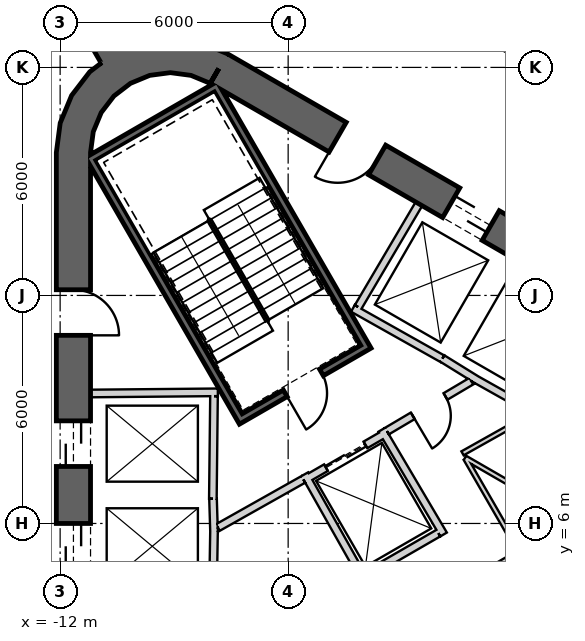
"""IFC4 building model, lengths in metres.
Left out: names, types, materials, properties, quantities, classifications, styles, units other than length and angle.
Written with IfcOpenShell. Run it as: python <this file> out.ifc"""

import sys

from ifc_helpers import new_model, si_unit, direction, frame, frame_2d, origin, place, context, subcontext, project, spatial, polyline, rectangle, outline, extrude, element, fill, save


model = new_model("IFC4")
c1 = context("Model", 3, precision=1e-05, world=origin(), true_north=direction((0.0, 1.0)))
c2 = subcontext(c1, "Body", "Model", "MODEL_VIEW")
j1 = project(units=[si_unit("LENGTHUNIT", "METRE"), si_unit("PLANEANGLEUNIT", "RADIAN")], contexts=[c1])
p1 = place(None, origin())
s1 = spatial("IfcSite", under=j1, at=p1, CompositionType="ELEMENT")
p2 = place(p1, origin())
s2 = spatial("IfcBuilding", under=s1, at=p2, CompositionType="ELEMENT")
p3 = place(p2, frame((0.0, 0.0, 107.0)))
s3 = spatial("IfcBuildingStorey", under=s2, at=p3, CompositionType="ELEMENT", Elevation=107.0)
p4 = place(p3, frame((19.475, 2.208, 0.0), z_axis=(0.0, 0.0, 1.0), x_axis=(-0.866028369851, 0.499994862586, 0.0)))
e1 = element("IfcWall", 1, at=p4, inside=s3, PredefinedType="SHEAR", context=c2, shape_type="SweptSolid", body=[
    extrude(rectangle(XDim=31.523, YDim=0.9, at=frame_2d((15.762, 0.0))), origin(), (0.0, 0.0, 1.0), 4.1),
])
p5 = place(p4, frame((7.062, 0.0, 0.0)))
e2 = element("IfcOpeningElement", 2, at=p5, cuts=e1, PredefinedType="OPENING", context=c2, shape_type="SweptSolid", body=[
    extrude(rectangle(XDim=1.2, YDim=2.4, at=frame_2d((0.6, 1.2))), frame((0.0, 0.46, 0.0), z_axis=(0.0, -1.0, 0.0), x_axis=(1.0, 0.0, 0.0)), (0.0, 0.0, 1.0), 0.92),
])
p6 = place(p4, frame((9.762, 0.0, 0.0)))
e3 = element("IfcOpeningElement", 3, at=p6, cuts=e1, PredefinedType="OPENING", context=c2, shape_type="SweptSolid", body=[
    extrude(rectangle(XDim=1.2, YDim=2.4, at=frame_2d((0.6, 1.2))), frame((0.0, 0.46, 0.0), z_axis=(0.0, -1.0, 0.0), x_axis=(1.0, 0.0, 0.0)), (0.0, 0.0, 1.0), 0.92),
])
p7 = place(p4, frame((12.462, 0.0, 0.0)))
e4 = element("IfcOpeningElement", 4, at=p7, cuts=e1, PredefinedType="OPENING", context=c2, shape_type="SweptSolid", body=[
    extrude(rectangle(XDim=1.2, YDim=2.4, at=frame_2d((0.6, 1.2))), frame((0.0, 0.46, 0.0), z_axis=(0.0, -1.0, 0.0), x_axis=(1.0, 0.0, 0.0)), (0.0, 0.0, 1.0), 0.92),
])
p8 = place(p4, frame((15.162, 0.0, 0.0)))
e5 = element("IfcOpeningElement", 5, at=p8, cuts=e1, PredefinedType="OPENING", context=c2, shape_type="SweptSolid", body=[
    extrude(rectangle(XDim=1.2, YDim=2.4, at=frame_2d((0.6, 1.2))), frame((0.0, 0.46, 0.0), z_axis=(0.0, -1.0, 0.0), x_axis=(1.0, 0.0, 0.0)), (0.0, 0.0, 1.0), 0.92),
])
p9 = place(p4, frame((17.862, 0.0, 0.0)))
e6 = element("IfcOpeningElement", 6, at=p9, cuts=e1, PredefinedType="OPENING", context=c2, shape_type="SweptSolid", body=[
    extrude(rectangle(XDim=1.2, YDim=2.4, at=frame_2d((0.6, 1.2))), frame((0.0, 0.46, 0.0), z_axis=(0.0, -1.0, 0.0), x_axis=(1.0, 0.0, 0.0)), (0.0, 0.0, 1.0), 0.92),
])
p10 = place(p4, frame((20.562, 0.0, 0.0)))
e7 = element("IfcOpeningElement", 7, at=p10, cuts=e1, PredefinedType="OPENING", context=c2, shape_type="SweptSolid", body=[
    extrude(rectangle(XDim=1.2, YDim=2.4, at=frame_2d((0.6, 1.2))), frame((0.0, 0.46, 0.0), z_axis=(0.0, -1.0, 0.0), x_axis=(1.0, 0.0, 0.0)), (0.0, 0.0, 1.0), 0.92),
])
p11 = place(p4, frame((23.262, 0.0, 0.0)))
e8 = element("IfcOpeningElement", 8, at=p11, cuts=e1, PredefinedType="OPENING", context=c2, shape_type="SweptSolid", body=[
    extrude(rectangle(XDim=1.2, YDim=2.4, at=frame_2d((0.6, 1.2))), frame((0.0, 0.46, 0.0), z_axis=(0.0, -1.0, 0.0), x_axis=(1.0, 0.0, 0.0)), (0.0, 0.0, 1.0), 0.92),
])
p12 = place(p4, frame((3.612, 0.0, 0.0)))
e9 = element("IfcOpeningElement", 9, at=p12, cuts=e1, PredefinedType="OPENING", context=c2, shape_type="SweptSolid", body=[
    extrude(rectangle(XDim=1.2, YDim=2.4, at=frame_2d((0.6, 1.2))), frame((0.0, 0.46, 0.0), z_axis=(0.0, -1.0, 0.0), x_axis=(1.0, 0.0, 0.0)), (0.0, 0.0, 1.0), 0.92),
])
p13 = place(p4, frame((26.712, 0.0, 0.0)))
e10 = element("IfcOpeningElement", 10, at=p13, cuts=e1, PredefinedType="OPENING", context=c2, shape_type="SweptSolid", body=[
    extrude(rectangle(XDim=1.2, YDim=2.4, at=frame_2d((0.6, 1.2))), frame((0.0, 0.46, 0.0), z_axis=(0.0, -1.0, 0.0), x_axis=(1.0, 0.0, 0.0)), (0.0, 0.0, 1.0), 0.92),
])
p14 = place(p3, frame((-11.65, 15.762, 0.0), z_axis=(0.0, 0.0, 1.0), x_axis=(0.0, -1.0, 0.0)))
e11 = element("IfcWall", 11, at=p14, inside=s3, PredefinedType="SHEAR", context=c2, shape_type="SweptSolid", body=[
    extrude(rectangle(XDim=31.523, YDim=0.9, at=frame_2d((15.762, 0.0))), origin(), (0.0, 0.0, 1.0), 4.1),
])
p15 = place(p14, frame((7.062, 0.0, 0.0)))
e12 = element("IfcOpeningElement", 12, at=p15, cuts=e11, PredefinedType="OPENING", context=c2, shape_type="SweptSolid", body=[
    extrude(rectangle(XDim=1.2, YDim=2.4, at=frame_2d((0.6, 1.2))), frame((0.0, 0.46, 0.0), z_axis=(0.0, -1.0, 0.0), x_axis=(1.0, 0.0, 0.0)), (0.0, 0.0, 1.0), 0.92),
])
p16 = place(p14, frame((9.762, 0.0, 0.0)))
e13 = element("IfcOpeningElement", 13, at=p16, cuts=e11, PredefinedType="OPENING", context=c2, shape_type="SweptSolid", body=[
    extrude(rectangle(XDim=1.2, YDim=2.4, at=frame_2d((0.6, 1.2))), frame((0.0, 0.46, 0.0), z_axis=(0.0, -1.0, 0.0), x_axis=(1.0, 0.0, 0.0)), (0.0, 0.0, 1.0), 0.92),
])
p17 = place(p14, frame((12.462, 0.0, 0.0)))
e14 = element("IfcOpeningElement", 14, at=p17, cuts=e11, PredefinedType="OPENING", context=c2, shape_type="SweptSolid", body=[
    extrude(rectangle(XDim=1.2, YDim=2.4, at=frame_2d((0.6, 1.2))), frame((0.0, 0.46, 0.0), z_axis=(0.0, -1.0, 0.0), x_axis=(1.0, 0.0, 0.0)), (0.0, 0.0, 1.0), 0.92),
])
p18 = place(p14, frame((15.162, 0.0, 0.0)))
e15 = element("IfcOpeningElement", 15, at=p18, cuts=e11, PredefinedType="OPENING", context=c2, shape_type="SweptSolid", body=[
    extrude(rectangle(XDim=1.2, YDim=2.4, at=frame_2d((0.6, 1.2))), frame((0.0, 0.46, 0.0), z_axis=(0.0, -1.0, 0.0), x_axis=(1.0, 0.0, 0.0)), (0.0, 0.0, 1.0), 0.92),
])
p19 = place(p14, frame((17.862, 0.0, 0.0)))
e16 = element("IfcOpeningElement", 16, at=p19, cuts=e11, PredefinedType="OPENING", context=c2, shape_type="SweptSolid", body=[
    extrude(rectangle(XDim=1.2, YDim=2.4, at=frame_2d((0.6, 1.2))), frame((0.0, 0.46, 0.0), z_axis=(0.0, -1.0, 0.0), x_axis=(1.0, 0.0, 0.0)), (0.0, 0.0, 1.0), 0.92),
])
p20 = place(p14, frame((20.562, 0.0, 0.0)))
e17 = element("IfcOpeningElement", 17, at=p20, cuts=e11, PredefinedType="OPENING", context=c2, shape_type="SweptSolid", body=[
    extrude(rectangle(XDim=1.2, YDim=2.4, at=frame_2d((0.6, 1.2))), frame((0.0, 0.46, 0.0), z_axis=(0.0, -1.0, 0.0), x_axis=(1.0, 0.0, 0.0)), (0.0, 0.0, 1.0), 0.92),
])
p21 = place(p14, frame((23.262, 0.0, 0.0)))
e18 = element("IfcOpeningElement", 18, at=p21, cuts=e11, PredefinedType="OPENING", context=c2, shape_type="SweptSolid", body=[
    extrude(rectangle(XDim=1.2, YDim=2.4, at=frame_2d((0.6, 1.2))), frame((0.0, 0.46, 0.0), z_axis=(0.0, -1.0, 0.0), x_axis=(1.0, 0.0, 0.0)), (0.0, 0.0, 1.0), 0.92),
])
p22 = place(p14, frame((3.612, 0.0, 0.0)))
e19 = element("IfcOpeningElement", 19, at=p22, cuts=e11, PredefinedType="OPENING", context=c2, shape_type="SweptSolid", body=[
    extrude(rectangle(XDim=1.2, YDim=2.4, at=frame_2d((0.6, 1.2))), frame((0.0, 0.46, 0.0), z_axis=(0.0, -1.0, 0.0), x_axis=(1.0, 0.0, 0.0)), (0.0, 0.0, 1.0), 0.92),
])
p23 = place(p14, frame((26.712, 0.0, 0.0)))
e20 = element("IfcOpeningElement", 20, at=p23, cuts=e11, PredefinedType="OPENING", context=c2, shape_type="SweptSolid", body=[
    extrude(rectangle(XDim=1.2, YDim=2.4, at=frame_2d((0.6, 1.2))), frame((0.0, 0.46, 0.0), z_axis=(0.0, -1.0, 0.0), x_axis=(1.0, 0.0, 0.0)), (0.0, 0.0, 1.0), 0.92),
])
p24 = place(p3, origin())
e21 = element("IfcWall", 21, at=p24, inside=s3, PredefinedType="SHEAR", context=c2, shape_type="SweptSolid", body=[
    extrude(outline(polyline([(-7.6, 18.36), (-8.323, 18.659), (-9.1, 18.762), (-9.876, 18.659), (-10.6, 18.36), (-11.221, 17.883), (-11.698, 17.262), (-11.998, 16.538), (-12.1, 15.762), (-11.2, 15.762), (-11.128, 16.305), (-10.919, 16.812), (-10.585, 17.247), (-10.15, 17.58), (-9.644, 17.79), (-9.1, 17.862), (-8.556, 17.79), (-8.05, 17.58), (-7.6, 18.36)])), origin(), (0.0, 0.0, 1.0), 4.1),
])
p25 = place(p3, frame((-10.575, 18.316, 0.0), z_axis=(0.0, 0.0, 1.0), x_axis=(-0.500003112169, 0.866023606965, 0.0)))
e22 = element("IfcWall", 22, at=p25, inside=s3, PredefinedType="SHEAR", context=c2, shape_type="SweptSolid", body=[
    extrude(rectangle(XDim=13.027, YDim=0.8, at=frame_2d((6.513, 0.0))), origin(), (0.0, 0.0, 1.0), 4.1),
])
p26 = place(p25, frame((1.3, 0.0, 0.0)))
e23 = element("IfcOpeningElement", 23, at=p26, cuts=e22, PredefinedType="OPENING", context=c2, shape_type="SweptSolid", body=[
    extrude(rectangle(XDim=1.4, YDim=2.4, at=frame_2d((0.7, 1.2))), frame((0.0, 0.41, 0.0), z_axis=(0.0, -1.0, 0.0), x_axis=(1.0, 0.0, 0.0)), (0.0, 0.0, 1.0), 0.82),
])
p27 = place(p3, frame((-11.2, 9.42, 0.0), z_axis=(0.0, 0.0, 1.0), x_axis=(0.999957167047, 0.009255488683, 0.0)))
e24 = element("IfcWall", 24, at=p27, inside=s3, PredefinedType="PLUMBINGWALL", context=c2, shape_type="SweptSolid", body=[
    extrude(rectangle(XDim=3.35, YDim=0.2, at=frame_2d((1.675, 0.0))), origin(), (0.0, 0.0, 1.0), 3.8),
])
p28 = place(p3, frame((-7.951, 9.35, 0.0), z_axis=(0.0, 0.0, 1.0), x_axis=(-0.011120469654, -0.999938165666, 0.0)))
e25 = element("IfcWall", 25, at=p28, inside=s3, PredefinedType="PLUMBINGWALL", context=c2, shape_type="SweptSolid", body=[
    extrude(rectangle(XDim=2.7, YDim=0.2, at=frame_2d((1.35, 0.0))), origin(), (0.0, 0.0, 1.0), 3.8),
])
p29 = place(p3, frame((-7.977, 6.65, 0.0), z_axis=(0.0, 0.0, 1.0), x_axis=(0.030861509705, -0.999523670164, 0.0)))
e26 = element("IfcWall", 26, at=p29, inside=s3, PredefinedType="PLUMBINGWALL", context=c2, shape_type="SweptSolid", body=[
    extrude(rectangle(XDim=0.878, YDim=0.2, at=frame_2d((0.439, 0.0))), origin(), (0.0, 0.0, 1.0), 3.8),
])
p30 = place(p3, frame((-7.949, 5.894, 0.0), z_axis=(0.0, 0.0, 1.0), x_axis=(-0.016809909365, -0.999858703491, 0.0)))
e27 = element("IfcWall", 27, at=p30, inside=s3, PredefinedType="PLUMBINGWALL", context=c2, shape_type="SweptSolid", body=[
    extrude(rectangle(XDim=1.844, YDim=0.2, at=frame_2d((0.922, 0.0))), origin(), (0.0, 0.0, 1.0), 3.8),
])
p31 = place(p3, frame((-1.941, 10.339, 0.0), z_axis=(0.0, 0.0, 1.0), x_axis=(0.850216889117, -0.526432561171, 0.0)))
e28 = element("IfcWall", 28, at=p31, inside=s3, PredefinedType="PLUMBINGWALL", context=c2, shape_type="SweptSolid", body=[
    extrude(rectangle(XDim=1.078, YDim=0.2, at=frame_2d((0.539, 0.0))), origin(), (0.0, 0.0, 1.0), 3.8),
])
p32 = place(p3, frame((0.478, 8.928, 0.0), z_axis=(0.0, 0.0, 1.0), x_axis=(-0.871988740738, 0.489525929882, 0.0)))
e29 = element("IfcWall", 29, at=p32, inside=s3, PredefinedType="PLUMBINGWALL", context=c2, shape_type="SweptSolid", body=[
    extrude(rectangle(XDim=1.845, YDim=0.2, at=frame_2d((0.922, 0.0))), origin(), (0.0, 0.0, 1.0), 3.8),
])
p33 = place(p3, frame((-4.296, 11.659, 0.0), z_axis=(0.0, 0.0, 1.0), x_axis=(0.871534483978, -0.490334215854, 0.0)))
e30 = element("IfcWall", 30, at=p33, inside=s3, PredefinedType="PLUMBINGWALL", context=c2, shape_type="SweptSolid", body=[
    extrude(rectangle(XDim=2.7, YDim=0.2, at=frame_2d((1.35, 0.0))), origin(), (0.0, 0.0, 1.0), 3.8),
])
p34 = place(p3, frame((-4.158, 11.696, 0.0), z_axis=(0.0, 0.0, 1.0), x_axis=(0.508018930956, 0.861345903683, 0.0)))
e31 = element("IfcWall", 31, at=p34, inside=s3, PredefinedType="PLUMBINGWALL", context=c2, shape_type="SweptSolid", body=[
    extrude(rectangle(XDim=3.15, YDim=0.2, at=frame_2d((1.575, 0.0))), origin(), (0.0, 0.0, 1.0), 3.8),
])
p35 = place(p3, frame((-11.245, 15.678, -0.3), z_axis=(0.0, 0.0, 1.0), x_axis=(0.499977274689, -0.866038523851, 0.0)))
e32 = element("IfcWall", 32, at=p35, inside=s3, PredefinedType="SHEAR", context=c2, shape_type="SweptSolid", body=[
    extrude(rectangle(XDim=8.1, YDim=0.2, at=frame_2d((4.05, 0.0))), origin(), (0.0, 0.0, 1.0), 4.1),
])
p36 = place(p3, frame((-7.818, 17.541, -0.3), z_axis=(0.0, 0.0, 1.0), x_axis=(-0.866044365799, -0.499967155389, 0.0)))
e33 = element("IfcWall", 33, at=p36, inside=s3, PredefinedType="SHEAR", context=c2, shape_type="SweptSolid", body=[
    extrude(rectangle(XDim=3.8, YDim=0.2, at=frame_2d((1.9, 0.0))), origin(), (0.0, 0.0, 1.0), 4.1),
])
p37 = place(p3, frame((-7.854, 17.405, -0.3), z_axis=(0.0, 0.0, 1.0), x_axis=(0.499997992926, -0.866026562566, 0.0)))
e34 = element("IfcWall", 34, at=p37, inside=s3, PredefinedType="SHEAR", context=c2, shape_type="SweptSolid", body=[
    extrude(rectangle(XDim=7.9, YDim=0.2, at=frame_2d((3.95, 0.0))), origin(), (0.0, 0.0, 1.0), 4.1),
])
p38 = place(p3, frame((-7.159, 8.8, -0.3), z_axis=(0.0, 0.0, 1.0), x_axis=(0.866047807691, 0.499961193289, 0.0)))
e35 = element("IfcWall", 35, at=p38, inside=s3, PredefinedType="SHEAR", context=c2, shape_type="SweptSolid", body=[
    extrude(rectangle(XDim=3.6, YDim=0.2, at=frame_2d((1.8, 0.0))), origin(), (0.0, 0.0, 1.0), 4.1),
])
p39 = place(p38, frame((1.25, 0.0, 0.3)))
e36 = element("IfcOpeningElement", 36, at=p39, cuts=e35, PredefinedType="OPENING", context=c2, shape_type="SweptSolid", body=[
    extrude(rectangle(XDim=1.1, YDim=2.1, at=frame_2d((0.55, 1.05))), frame((0.0, 0.11, 0.0), z_axis=(0.0, -1.0, 0.0), x_axis=(1.0, 0.0, 0.0)), (0.0, 0.0, 1.0), 0.22),
])
p40 = place(p3, frame((-5.524, 7.168, 0.0), z_axis=(0.0, 0.0, 1.0), x_axis=(0.866024647952, 0.500001309137, 0.0)))
e37 = element("IfcWall", 37, at=p40, inside=s3, PredefinedType="PLUMBINGWALL", context=c2, shape_type="SweptSolid", body=[
    extrude(rectangle(XDim=2.4, YDim=0.2, at=frame_2d((1.2, 0.0))), origin(), (0.0, 0.0, 1.0), 3.8),
])
p41 = place(p40, frame((0.6, 0.0, 0.0)))
e38 = element("IfcOpeningElement", 38, at=p41, cuts=e37, PredefinedType="OPENING", context=c2, shape_type="SweptSolid", body=[
    extrude(rectangle(XDim=1.2, YDim=2.4, at=frame_2d((0.6, 1.2))), frame((0.0, 0.11, 0.0), z_axis=(0.0, -1.0, 0.0), x_axis=(1.0, 0.0, 0.0)), (0.0, 0.0, 1.0), 0.22),
])
p42 = place(p3, frame((-4.039, 4.596, 0.0), z_axis=(0.0, 0.0, 1.0), x_axis=(-0.491322718731, 0.870977603649, 0.0)))
e39 = element("IfcWall", 39, at=p42, inside=s3, PredefinedType="PLUMBINGWALL", context=c2, shape_type="SweptSolid", body=[
    extrude(rectangle(XDim=3.1, YDim=0.2, at=frame_2d((1.55, 0.0))), origin(), (0.0, 0.0, 1.0), 3.8),
])
p43 = place(p3, frame((-3.538, 8.465, 0.0), z_axis=(0.0, 0.0, 1.0), x_axis=(0.508616218331, -0.860993346345, 0.0)))
e40 = element("IfcWall", 40, at=p43, inside=s3, PredefinedType="PLUMBINGWALL", context=c2, shape_type="SweptSolid", body=[
    extrude(rectangle(XDim=3.2, YDim=0.2, at=frame_2d((1.6, 0.0))), origin(), (0.0, 0.0, 1.0), 3.8),
])
p44 = place(p3, frame((-2.047, 5.746, 0.0), z_axis=(0.0, 0.0, 1.0), x_axis=(-0.866040491692, -0.499973866067, 0.0)))
e41 = element("IfcWall", 41, at=p44, inside=s3, PredefinedType="PLUMBINGWALL", context=c2, shape_type="SweptSolid", body=[
    extrude(rectangle(XDim=2.129, YDim=0.2, at=frame_2d((1.065, 0.0))), origin(), (0.0, 0.0, 1.0), 3.8),
])
p45 = place(p3, frame((-5.6, 7.16, 0.0), z_axis=(0.0, 0.0, 1.0), x_axis=(-0.871340486379, -0.490678873396, 0.0)))
e42 = element("IfcWall", 42, at=p45, inside=s3, PredefinedType="PARTITIONING", context=c2, shape_type="SweptSolid", body=[
    extrude(rectangle(XDim=2.581, YDim=0.2, at=frame_2d((1.291, 0.0))), origin(), (0.0, 0.0, 1.0), 3.8),
])
p46 = place(p3, frame((-1.179, 9.745, 0.0), z_axis=(0.0, 0.0, 1.0), x_axis=(-0.860598681535, -0.509283721849, 0.0)))
e43 = element("IfcWall", 43, at=p46, inside=s3, PredefinedType="PARTITIONING", context=c2, shape_type="SweptSolid", body=[
    extrude(rectangle(XDim=2.581, YDim=0.2, at=frame_2d((1.291, 0.0))), origin(), (0.0, 0.0, 1.0), 3.8),
])
p47 = place(p46, frame((0.791, 0.0, 0.0)))
e44 = element("IfcOpeningElement", 44, at=p47, cuts=e43, PredefinedType="OPENING", context=c2, shape_type="SweptSolid", body=[
    extrude(rectangle(XDim=1.0, YDim=2.1, at=frame_2d((0.5, 1.05))), frame((0.0, 0.11, 0.0), z_axis=(0.0, -1.0, 0.0), x_axis=(1.0, 0.0, 0.0)), (0.0, 0.0, 1.0), 0.22),
])
p48 = place(p3, frame((7.367, 2.7, 0.0), z_axis=(0.0, 0.0, 1.0), x_axis=(-0.866027158831, 0.499996960157, 0.0)))
e45 = element("IfcWall", 45, at=p48, inside=s3, PredefinedType="PARTITIONING", context=c2, shape_type="SweptSolid", body=[
    extrude(rectangle(XDim=10.06, YDim=0.12, at=frame_2d((5.03, 0.0))), origin(), (0.0, 0.0, 1.0), 3.8),
])
p49 = place(p3, frame((0.475, 8.905, 0.0), z_axis=(0.0, 0.0, 1.0), x_axis=(-0.871843519779, -0.489784521009, 0.0)))
e46 = element("IfcWall", 46, at=p49, inside=s3, PredefinedType="PARTITIONING", context=c2, shape_type="SweptSolid", body=[
    extrude(rectangle(XDim=2.164, YDim=0.12, at=frame_2d((1.082, 0.0))), origin(), (0.0, 0.0, 1.0), 3.8),
])
p50 = place(p3, frame((0.14, 5.277, 0.0), z_axis=(0.0, 0.0, 1.0), x_axis=(-0.866025242659, -0.500000279077, 0.0)))
e47 = element("IfcWall", 47, at=p50, inside=s3, PredefinedType="PARTITIONING", context=c2, shape_type="SweptSolid", body=[
    extrude(rectangle(XDim=1.775, YDim=0.12, at=frame_2d((0.887, 0.0))), origin(), (0.0, 0.0, 1.0), 3.8),
])
p51 = place(p3, frame((-1.33, 7.704, 0.0), z_axis=(0.0, 0.0, 1.0), x_axis=(0.500006584067, -0.866021602438, 0.0)))
e48 = element("IfcWall", 48, at=p51, inside=s3, PredefinedType="PARTITIONING", context=c2, shape_type="SweptSolid", body=[
    extrude(rectangle(XDim=2.777, YDim=0.12, at=frame_2d((1.388, 0.0))), origin(), (0.0, 0.0, 1.0), 3.8),
])
p52 = place(p3, frame((22.336, 5.464, 0.0), z_axis=(0.0, 0.0, 1.0), x_axis=(-0.866027503332, 0.499996363459, 0.0)))
e49 = element("IfcWall", 49, at=p52, inside=s3, PredefinedType="PARTITIONING", context=c2, shape_type="SweptSolid", body=[
    extrude(rectangle(XDim=33.022, YDim=0.2, at=frame_2d((16.511, 0.0))), origin(), (0.0, 0.0, 1.0), 2.98),
])
p53 = place(p52, frame((16.061, 0.0, 0.0)))
e50 = element("IfcOpeningElement", 50, at=p53, cuts=e49, PredefinedType="OPENING", context=c2, shape_type="SweptSolid", body=[
    extrude(rectangle(XDim=1.0, YDim=2.1, at=frame_2d((0.5, 1.05))), frame((0.0, 0.11, 0.0), z_axis=(0.0, -1.0, 0.0), x_axis=(1.0, 0.0, 0.0)), (0.0, 0.0, 1.0), 0.22),
])
p54 = place(p39, origin())
e51 = element("IfcDoor", 51, at=p54, inside=s3, OperationType="SINGLE_SWING_LEFT", PredefinedType="USERDEFINED", context=c2, shape_type="SweptSolid", body=[
    extrude(rectangle(XDim=1.1, YDim=2.1, at=frame_2d((0.55, 1.05))), frame((0.0, 0.025, 0.0), z_axis=(0.0, -1.0, 0.0), x_axis=(1.0, 0.0, 0.0)), (0.0, 0.0, 1.0), 0.05),
])
fill(e36, e51)
p55 = place(p47, origin())
e52 = element("IfcDoor", 52, at=p55, inside=s3, OperationType="SINGLE_SWING_LEFT", PredefinedType="USERDEFINED", context=c2, shape_type="SweptSolid", body=[
    extrude(rectangle(XDim=1.0, YDim=2.1, at=frame_2d((0.5, 1.05))), frame((0.0, 0.025, 0.0), z_axis=(0.0, -1.0, 0.0), x_axis=(1.0, 0.0, 0.0)), (0.0, 0.0, 1.0), 0.05),
])
fill(e44, e52)
p56 = place(p41, origin())
e53 = element("IfcDoor", 53, at=p56, inside=s3, OperationType="SLIDING_TO_LEFT", PredefinedType="USERDEFINED", context=c2, shape_type="SweptSolid", body=[
    extrude(rectangle(XDim=1.2, YDim=2.4, at=frame_2d((0.6, 1.2))), frame((0.0, 0.025, 0.0), z_axis=(0.0, -1.0, 0.0), x_axis=(1.0, 0.0, 0.0)), (0.0, 0.0, 1.0), 0.05),
])
fill(e38, e53)
p57 = place(p15, origin())
e54 = element("IfcDoor", 54, at=p57, inside=s3, OperationType="SLIDING_TO_LEFT", PredefinedType="USERDEFINED", context=c2, shape_type="SweptSolid", body=[
    extrude(rectangle(XDim=1.2, YDim=2.4, at=frame_2d((0.6, 1.2))), frame((0.0, 0.025, 0.0), z_axis=(0.0, -1.0, 0.0), x_axis=(1.0, 0.0, 0.0)), (0.0, 0.0, 1.0), 0.05),
])
fill(e12, e54)
p58 = place(p16, origin())
e55 = element("IfcDoor", 55, at=p58, inside=s3, OperationType="SLIDING_TO_LEFT", PredefinedType="USERDEFINED", context=c2, shape_type="SweptSolid", body=[
    extrude(rectangle(XDim=1.2, YDim=2.4, at=frame_2d((0.6, 1.2))), frame((0.0, 0.025, 0.0), z_axis=(0.0, -1.0, 0.0), x_axis=(1.0, 0.0, 0.0)), (0.0, 0.0, 1.0), 0.05),
])
fill(e13, e55)
p59 = place(p11, origin())
e56 = element("IfcDoor", 56, at=p59, inside=s3, OperationType="SLIDING_TO_LEFT", PredefinedType="USERDEFINED", context=c2, shape_type="SweptSolid", body=[
    extrude(rectangle(XDim=1.2, YDim=2.4, at=frame_2d((0.6, 1.2))), frame((0.0, 0.025, 0.0), z_axis=(0.0, -1.0, 0.0), x_axis=(1.0, 0.0, 0.0)), (0.0, 0.0, 1.0), 0.05),
])
fill(e8, e56)
p60 = place(p13, origin())
e57 = element("IfcDoor", 57, at=p60, inside=s3, OperationType="SINGLE_SWING_LEFT", PredefinedType="USERDEFINED", context=c2, shape_type="SweptSolid", body=[
    extrude(rectangle(XDim=1.2, YDim=2.4, at=frame_2d((0.6, 1.2))), frame((0.0, 0.025, 0.0), z_axis=(0.0, -1.0, 0.0), x_axis=(1.0, 0.0, 0.0)), (0.0, 0.0, 1.0), 0.05),
])
fill(e10, e57)
p61 = place(p22, origin())
e58 = element("IfcDoor", 58, at=p61, inside=s3, OperationType="SINGLE_SWING_LEFT", PredefinedType="USERDEFINED", context=c2, shape_type="SweptSolid", body=[
    extrude(rectangle(XDim=1.2, YDim=2.4, at=frame_2d((0.6, 1.2))), frame((0.0, 0.025, 0.0), z_axis=(0.0, -1.0, 0.0), x_axis=(1.0, 0.0, 0.0)), (0.0, 0.0, 1.0), 0.05),
])
fill(e19, e58)
save(model, sys.argv[1])
